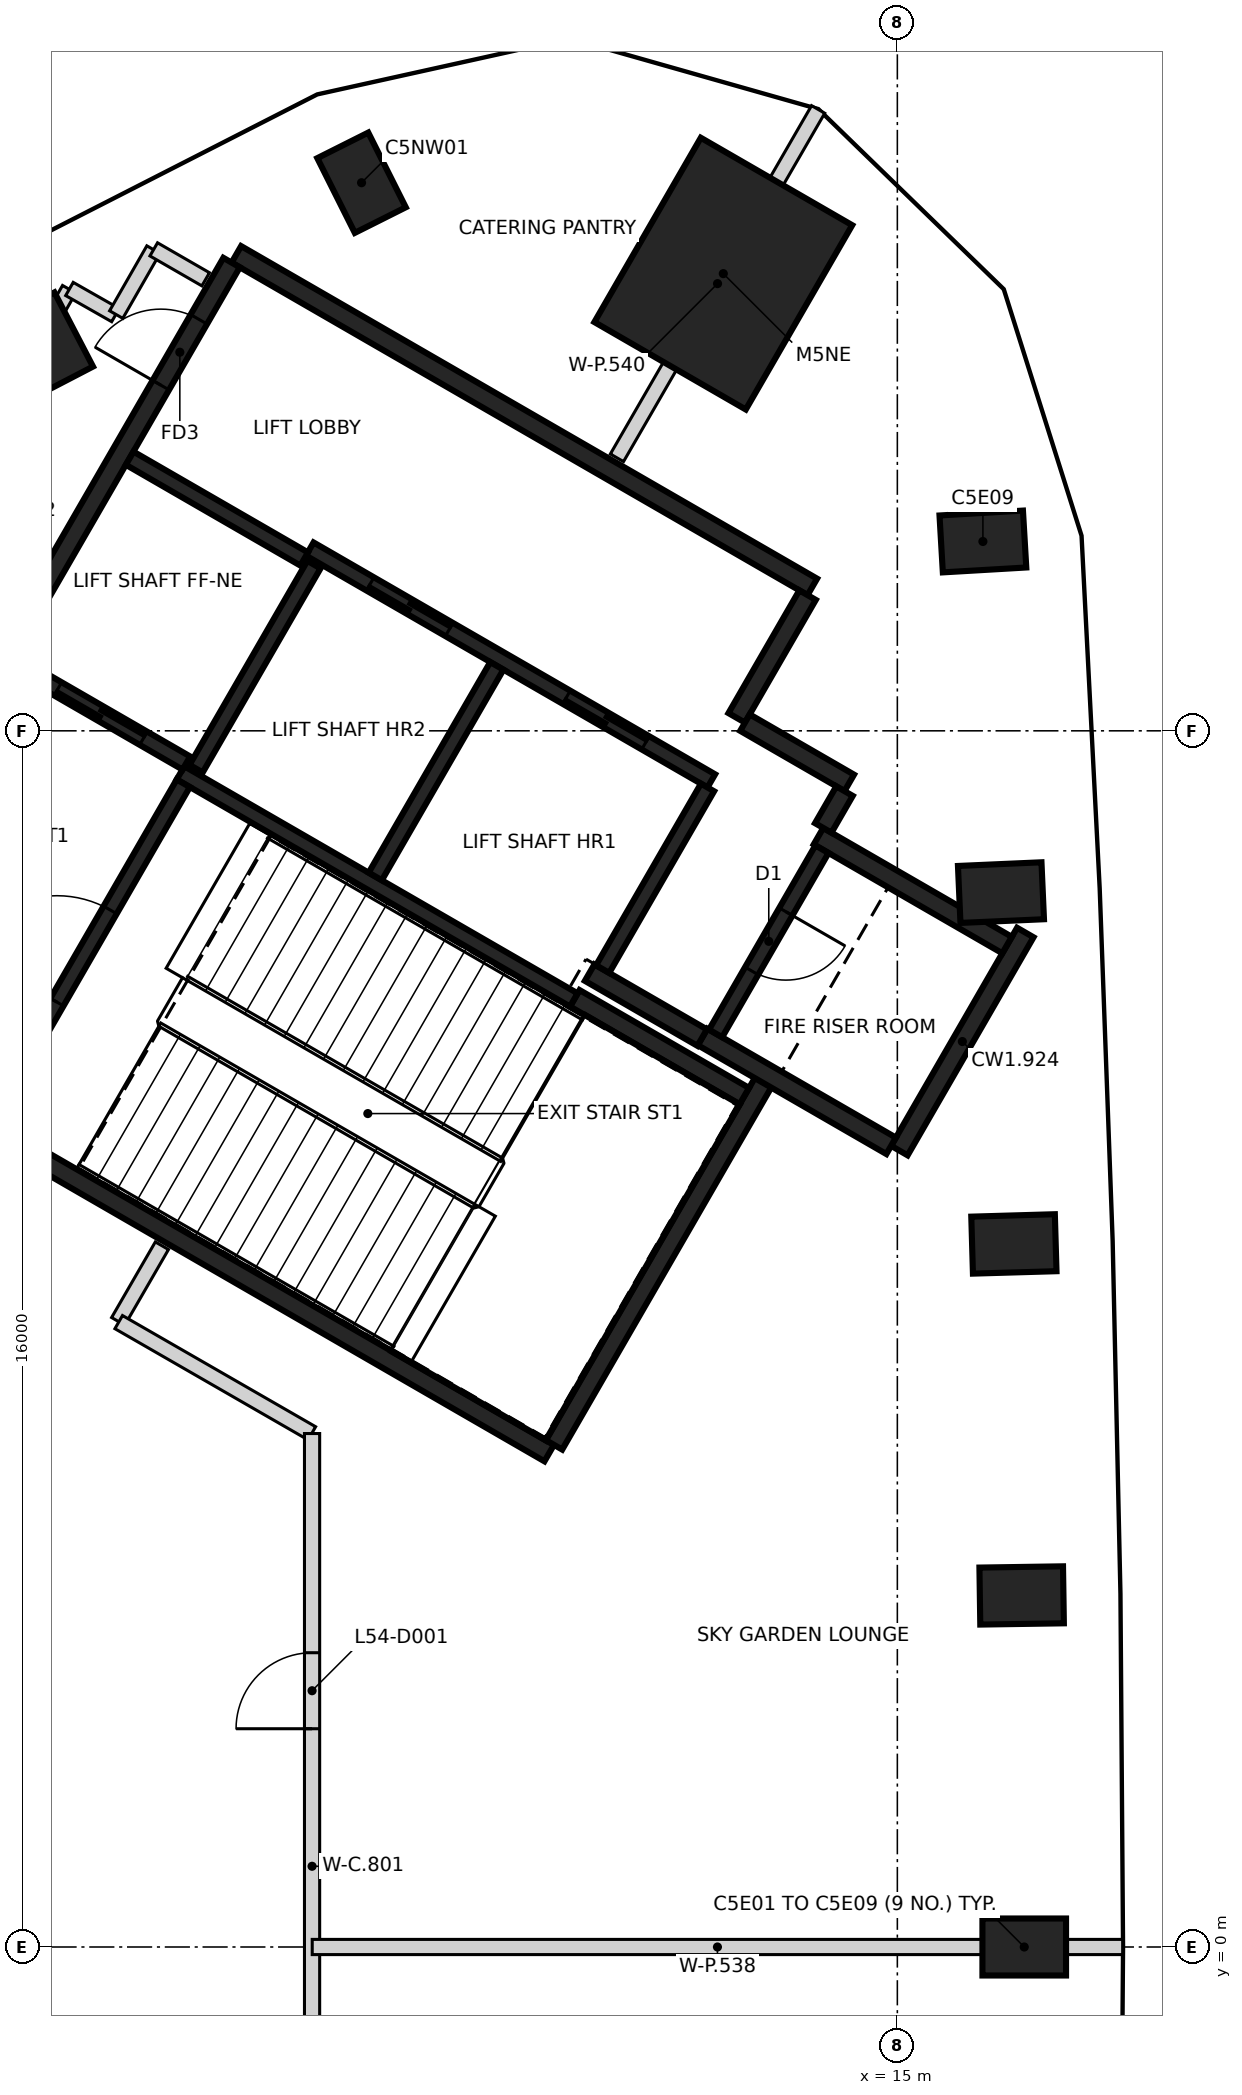
"""IFC4 building model, lengths in metres.
Left out: names, types, materials, properties, quantities, classifications, styles, units other than length and angle.
Written with IfcOpenShell. Run it as: python <this file> out.ifc"""

import sys

from ifc_helpers import new_model, si_unit, direction, frame, frame_2d, origin, origin_2d, place, context, subcontext, project, spatial, rectangle, extrude, element, fill, save


model = new_model("IFC4")
c1 = context("Model", 3, precision=1e-05, world=origin(), true_north=direction((0.0, 1.0)))
c2 = subcontext(c1, "Body", "Model", "MODEL_VIEW")
j1 = project(units=[si_unit("LENGTHUNIT", "METRE"), si_unit("PLANEANGLEUNIT", "RADIAN")], contexts=[c1])
p1 = place(None, origin())
s1 = spatial("IfcSite", under=j1, at=p1, CompositionType="ELEMENT")
p2 = place(p1, origin())
s2 = spatial("IfcBuilding", under=s1, at=p2, CompositionType="ELEMENT")
p3 = place(p2, frame((0.0, 0.0, 216.4)))
s3 = spatial("IfcBuildingStorey", under=s2, at=p3, CompositionType="ELEMENT", Elevation=216.4)
for number, where, z_axis, x_axis in (
    (1, (16.669, 0.0, -0.35), (0.0, 0.0, 1.0), (1.0, 0.0, 0.0)),
    (2, (16.635, 4.625, -0.35), (0.0, 0.0, 1.0), (1.0, 0.015, 0.0)),
    (3, (16.533, 9.25, -0.35), (0.0, 0.0, 1.0), (1.0, 0.029, 0.0)),
    (4, (16.363, 13.872, -0.35), (0.0, 0.0, 1.0), (0.999, 0.044, 0.0)),
    (5, (16.125, 18.491, -0.35), (0.0, 0.0, 1.0), (0.998, 0.058, 0.0)),
    (6, (7.951, 23.211, -0.35), (0.0, 0.0, 1.0), (-0.449, 0.894, 0.0)),
    (7, (3.832, 21.107, -0.35), (0.0, 0.0, 1.0), (-0.461, 0.887, 0.0)),
):
    element("IfcColumn", number, at=place(p3, frame(where, z_axis=z_axis, x_axis=x_axis)), inside=s3, PredefinedType="COLUMN", context=c2, shape_type="SweptSolid", body=[
        extrude(rectangle(XDim=1.1, YDim=0.75, at=origin_2d()), origin(), (0.0, 0.0, 1.0), 5.0),
    ])
p4 = place(p3, frame((12.71, 22.015, -0.35), z_axis=(0.0, 0.0, 1.0), x_axis=(0.5, 0.866025403784, 0.0)))
e8 = element("IfcColumn", 8, at=p4, inside=s3, PredefinedType="COLUMN", context=c2, shape_type="SweptSolid", body=[
    extrude(rectangle(XDim=2.8, YDim=2.3, at=origin_2d()), origin(), (0.0, 0.0, 1.0), 5.0),
])
p5 = place(p3, frame((10.42, 6.498, 0.0), z_axis=(0.0, 0.0, 1.0), x_axis=(-0.866021906294, 0.500006057782, 0.0)))
e9 = element("IfcWall", 9, at=p5, inside=s3, PredefinedType="SHEAR", context=c2, shape_type="SweptSolid", body=[
    extrude(rectangle(XDim=11.55, YDim=0.25, at=frame_2d((5.775, 0.0))), origin(), (0.0, 0.0, 1.0), 4.65),
])
p6 = place(p5, frame((10.025, 0.0, 0.0)))
e10 = element("IfcOpeningElement", 10, at=p6, cuts=e9, PredefinedType="OPENING", context=c2, shape_type="SweptSolid", body=[
    extrude(rectangle(XDim=1.2, YDim=2.1, at=frame_2d((0.6, 1.05))), frame((0.0, 0.135, 0.0), z_axis=(0.0, -1.0, 0.0), x_axis=(1.0, 0.0, 0.0)), (0.0, 0.0, 1.0), 0.27),
])
p7 = place(p5, frame((8.725, 0.0, 0.0)))
e11 = element("IfcOpeningElement", 11, at=p7, cuts=e9, PredefinedType="OPENING", context=c2, shape_type="SweptSolid", body=[
    extrude(rectangle(XDim=1.2, YDim=2.1, at=frame_2d((0.6, 1.05))), frame((0.0, 0.135, 0.0), z_axis=(0.0, -1.0, 0.0), x_axis=(1.0, 0.0, 0.0)), (0.0, 0.0, 1.0), 0.27),
])
p8 = place(p3, frame((6.304, 22.269, 0.0), z_axis=(0.0, 0.0, 1.0), x_axis=(0.866022959057, -0.500004234368, 0.0)))
e12 = element("IfcWall", 12, at=p8, inside=s3, PredefinedType="SHEAR", context=c2, shape_type="SweptSolid", body=[
    extrude(rectangle(XDim=8.75, YDim=0.25, at=frame_2d((4.375, 0.0))), origin(), (0.0, 0.0, 1.0), 4.65),
])
p9 = place(p3, frame((3.179, 16.856, 0.0), z_axis=(0.0, 0.0, 1.0), x_axis=(0.500001955336, 0.866024274868, 0.0)))
e13 = element("IfcWall", 13, at=p9, inside=s3, PredefinedType="SHEAR", context=c2, shape_type="SweptSolid", body=[
    extrude(rectangle(XDim=6.125, YDim=0.25, at=frame_2d((3.062, 0.0))), origin(), (0.0, 0.0, 1.0), 4.65),
])
p10 = place(p9, frame((4.263, 0.0, 0.0)))
e14 = element("IfcOpeningElement", 14, at=p10, cuts=e13, PredefinedType="OPENING", context=c2, shape_type="SweptSolid", body=[
    extrude(rectangle(XDim=1.0, YDim=2.1, at=frame_2d((0.5, 1.05))), frame((0.0, 0.135, 0.0), z_axis=(0.0, -1.0, 0.0), x_axis=(1.0, 0.0, 0.0)), (0.0, 0.0, 1.0), 0.27),
])
p11 = place(p3, frame((13.238, 11.378, 0.0), z_axis=(0.0, 0.0, 1.0), x_axis=(-0.500008851346, -0.866020293397, 0.0)))
e15 = element("IfcWall", 15, at=p11, inside=s3, PredefinedType="SHEAR", context=c2, shape_type="SweptSolid", body=[
    extrude(rectangle(XDim=5.51, YDim=0.25, at=frame_2d((2.755, 0.0))), origin(), (0.0, 0.0, 1.0), 4.65),
])
p12 = place(p3, frame((16.684, 13.347, 0.0), z_axis=(0.0, 0.0, 1.0), x_axis=(-0.499998874531, -0.866026053573, 0.0)))
e16 = element("IfcWall", 16, at=p12, inside=s3, PredefinedType="SHEAR", context=c2, shape_type="SweptSolid", body=[
    extrude(rectangle(XDim=3.313, YDim=0.25, at=frame_2d((1.656, 0.0))), origin(), (0.0, 0.0, 1.0), 4.65),
])
p13 = place(p3, frame((14.918, 10.54, 0.0), z_axis=(0.0, 0.0, 1.0), x_axis=(-0.866063538972, 0.499933942099, 0.0)))
e17 = element("IfcWall", 17, at=p13, inside=s3, PredefinedType="SHEAR", context=c2, shape_type="SweptSolid", body=[
    extrude(rectangle(XDim=2.865, YDim=0.25, at=frame_2d((1.432, 0.0))), origin(), (0.0, 0.0, 1.0), 4.65),
])
p14 = place(p3, frame((13.963, 14.614, 0.0), z_axis=(0.0, 0.0, 1.0), x_axis=(0.866042235819, -0.499970844928, 0.0)))
e18 = element("IfcWall", 18, at=p14, inside=s3, PredefinedType="SHEAR", context=c2, shape_type="SweptSolid", body=[
    extrude(rectangle(XDim=2.865, YDim=0.25, at=frame_2d((1.432, 0.0))), origin(), (0.0, 0.0, 1.0), 4.65),
])
p15 = place(p3, frame((10.757, 12.481, 0.0), z_axis=(0.0, 0.0, 1.0), x_axis=(0.866022940537, -0.500004266446, 0.0)))
e19 = element("IfcWall", 19, at=p15, inside=s3, PredefinedType="SHEAR", context=c2, shape_type="SweptSolid", body=[
    extrude(rectangle(XDim=2.575, YDim=0.25, at=frame_2d((1.287, 0.0))), origin(), (0.0, 0.0, 1.0), 4.65),
])
p16 = place(p3, frame((13.819, 17.785, 0.0), z_axis=(0.0, 0.0, 1.0), x_axis=(-0.500039802285, -0.866002422705, 0.0)))
e20 = element("IfcWall", 20, at=p16, inside=s3, PredefinedType="SHEAR", context=c2, shape_type="SweptSolid", body=[
    extrude(rectangle(XDim=1.865, YDim=0.25, at=frame_2d((0.932, 0.0))), origin(), (0.0, 0.0, 1.0), 4.65),
])
p17 = place(p3, frame((12.433, 11.964, 0.0), z_axis=(0.0, 0.0, 1.0), x_axis=(-0.866038183914, 0.499977863513, 0.0)))
e21 = element("IfcWall", 21, at=p17, inside=s3, PredefinedType="SHEAR", context=c2, shape_type="SweptSolid", body=[
    extrude(rectangle(XDim=1.71, YDim=0.25, at=frame_2d((0.855, 0.0))), origin(), (0.0, 0.0, 1.0), 4.65),
])
p18 = place(p3, frame((12.995, 16.108, 0.0), z_axis=(0.0, 0.0, 1.0), x_axis=(0.866044474677, -0.49996696679, 0.0)))
e22 = element("IfcWall", 22, at=p18, inside=s3, PredefinedType="SHEAR", context=c2, shape_type="SweptSolid", body=[
    extrude(rectangle(XDim=1.584, YDim=0.25, at=frame_2d((0.792, 0.0))), origin(), (0.0, 0.0, 1.0), 4.65),
])
p19 = place(p3, frame((14.305, 15.207, 0.0), z_axis=(0.0, 0.0, 1.0), x_axis=(-0.499848422343, -0.866112899501, 0.0)))
e23 = element("IfcWall", 23, at=p19, inside=s3, PredefinedType="SHEAR", context=c2, shape_type="SweptSolid", body=[
    extrude(rectangle(XDim=0.559, YDim=0.25, at=frame_2d((0.28, 0.0))), origin(), (0.0, 0.0, 1.0), 4.65),
])
p20 = place(p3, frame((12.552, 15.342, 0.0), z_axis=(0.0, 0.0, 1.0), x_axis=(-0.866030299012, 0.499991521122, 0.0)))
e24 = element("IfcWall", 24, at=p20, inside=s3, PredefinedType="SHEAR", context=c2, shape_type="SweptSolid", body=[
    extrude(rectangle(XDim=6.1, YDim=0.2, at=frame_2d((3.05, 0.0))), origin(), (0.0, 0.0, 1.0), 4.65),
])
p21 = place(p20, frame((1.0, 0.0, 0.0)))
e25 = element("IfcOpeningElement", 25, at=p21, cuts=e24, PredefinedType="OPENING", context=c2, shape_type="SweptSolid", body=[
    extrude(rectangle(XDim=1.2, YDim=2.1, at=frame_2d((0.6, 1.05))), frame((0.0, 0.11, 0.0), z_axis=(0.0, -1.0, 0.0), x_axis=(1.0, 0.0, 0.0)), (0.0, 0.0, 1.0), 0.22),
])
p22 = place(p20, frame((3.982, 0.0, 0.0)))
e26 = element("IfcOpeningElement", 26, at=p22, cuts=e24, PredefinedType="OPENING", context=c2, shape_type="SweptSolid", body=[
    extrude(rectangle(XDim=1.2, YDim=2.1, at=frame_2d((0.6, 1.05))), frame((0.0, 0.11, 0.0), z_axis=(0.0, -1.0, 0.0), x_axis=(1.0, 0.0, 0.0)), (0.0, 0.0, 1.0), 0.22),
])
p23 = place(p3, frame((10.743, 12.46, 0.0), z_axis=(0.0, 0.0, 1.0), x_axis=(-0.866018848283, 0.500011354289, 0.0)))
e27 = element("IfcWall", 27, at=p23, inside=s3, PredefinedType="SHEAR", context=c2, shape_type="SweptSolid", body=[
    extrude(rectangle(XDim=5.974, YDim=0.2, at=frame_2d((2.987, 0.0))), origin(), (0.0, 0.0, 1.0), 4.65),
])
p24 = place(p3, frame((3.057, 10.895, 0.0), z_axis=(0.0, 0.0, 1.0), x_axis=(0.500027839223, 0.866009330205, 0.0)))
e28 = element("IfcWall", 28, at=p24, inside=s3, PredefinedType="SHEAR", context=c2, shape_type="SweptSolid", body=[
    extrude(rectangle(XDim=5.098, YDim=0.2, at=frame_2d((2.549, 0.0))), origin(), (0.0, 0.0, 1.0), 4.65),
])
p25 = place(p24, frame((1.774, 0.0, 0.0)))
e29 = element("IfcOpeningElement", 29, at=p25, cuts=e28, PredefinedType="OPENING", context=c2, shape_type="SweptSolid", body=[
    extrude(rectangle(XDim=1.4, YDim=2.1, at=frame_2d((0.7, 1.05))), frame((0.0, 0.11, 0.0), z_axis=(0.0, -1.0, 0.0), x_axis=(1.0, 0.0, 0.0)), (0.0, 0.0, 1.0), 0.22),
])
p26 = place(p3, frame((8.132, 14.084, 0.0), z_axis=(0.0, 0.0, 1.0), x_axis=(0.500030834389, 0.86600760081, 0.0)))
e30 = element("IfcWall", 30, at=p26, inside=s3, PredefinedType="SHEAR", context=c2, shape_type="SweptSolid", body=[
    extrude(rectangle(XDim=3.198, YDim=0.2, at=frame_2d((1.599, 0.0))), origin(), (0.0, 0.0, 1.0), 4.65),
])
p27 = place(p3, frame((14.008, 14.442, 0.0), z_axis=(0.0, 0.0, 1.0), x_axis=(-0.499986818241, -0.866033014143, 0.0)))
e31 = element("IfcWall", 31, at=p27, inside=s3, PredefinedType="SHEAR", context=c2, shape_type="SweptSolid", body=[
    extrude(rectangle(XDim=2.798, YDim=0.2, at=frame_2d((1.399, 0.0))), origin(), (0.0, 0.0, 1.0), 4.65),
])
p28 = place(p27, frame((0.949, 0.0, 0.0)))
e32 = element("IfcOpeningElement", 32, at=p28, cuts=e31, PredefinedType="OPENING", context=c2, shape_type="SweptSolid", body=[
    extrude(rectangle(XDim=0.9, YDim=2.1, at=frame_2d((0.45, 1.05))), frame((0.0, 0.11, 0.0), z_axis=(0.0, -1.0, 0.0), x_axis=(1.0, 0.0, 0.0)), (0.0, 0.0, 1.0), 0.22),
])
p29 = place(p3, frame((12.502, 15.255, 0.0), z_axis=(0.0, 0.0, 1.0), x_axis=(-0.499965018551, -0.866045599391, 0.0)))
e33 = element("IfcWall", 33, at=p29, inside=s3, PredefinedType="SHEAR", context=c2, shape_type="SweptSolid", body=[
    extrude(rectangle(XDim=2.759, YDim=0.2, at=frame_2d((1.379, 0.0))), origin(), (0.0, 0.0, 1.0), 4.65),
])
p30 = place(p3, frame((7.324, 18.187, 0.0), z_axis=(0.0, 0.0, 1.0), x_axis=(-0.499967891604, -0.866043940782, 0.0)))
e34 = element("IfcWall", 34, at=p30, inside=s3, PredefinedType="SHEAR", context=c2, shape_type="SweptSolid", body=[
    extrude(rectangle(XDim=3.1, YDim=0.2, at=frame_2d((1.55, 0.0))), origin(), (0.0, 0.0, 1.0), 4.65),
])
p31 = place(p3, frame((5.646, 15.576, 0.0), z_axis=(0.0, 0.0, 1.0), x_axis=(-0.866018407898, 0.500012117035, 0.0)))
e35 = element("IfcWall", 35, at=p31, inside=s3, PredefinedType="SHEAR", context=c2, shape_type="SweptSolid", body=[
    extrude(rectangle(XDim=2.651, YDim=0.2, at=frame_2d((1.325, 0.0))), origin(), (0.0, 0.0, 1.0), 4.65),
])
p32 = place(p31, frame((0.652, 0.0, 0.0)))
e36 = element("IfcOpeningElement", 36, at=p32, cuts=e35, PredefinedType="OPENING", context=c2, shape_type="SweptSolid", body=[
    extrude(rectangle(XDim=1.3, YDim=2.1, at=frame_2d((0.65, 1.05))), frame((0.0, 0.11, 0.0), z_axis=(0.0, -1.0, 0.0), x_axis=(1.0, 0.0, 0.0)), (0.0, 0.0, 1.0), 0.22),
])
p33 = place(p3, frame((7.196, 18.26, 0.0), z_axis=(0.0, 0.0, 1.0), x_axis=(-0.866018407898, 0.500012117035, 0.0)))
e37 = element("IfcWall", 37, at=p33, inside=s3, PredefinedType="SHEAR", context=c2, shape_type="SweptSolid", body=[
    extrude(rectangle(XDim=2.651, YDim=0.2, at=frame_2d((1.325, 0.0))), origin(), (0.0, 0.0, 1.0), 4.65),
])
p34 = place(p3, frame((-1.036, 12.743, 0.0), z_axis=(0.0, 0.0, 1.0), x_axis=(0.49314672747, 0.869946150739, 0.0)))
e38 = element("IfcWall", 38, at=p34, inside=s3, PredefinedType="PARTITIONING", context=c2, shape_type="SweptSolid", body=[
    extrude(rectangle(XDim=10.423, YDim=0.2, at=frame_2d((5.211, 0.0))), origin(), (0.0, 0.0, 1.0), 3.75),
])
p35 = place(p34, frame((5.612, 0.0, 0.0)))
e39 = element("IfcOpeningElement", 39, at=p35, cuts=e38, PredefinedType="OPENING", context=c2, shape_type="SweptSolid", body=[
    extrude(rectangle(XDim=0.9, YDim=2.1, at=frame_2d((0.45, 1.05))), frame((0.0, 0.11, 0.0), z_axis=(0.0, -1.0, 0.0), x_axis=(1.0, 0.0, 0.0)), (0.0, 0.0, 1.0), 0.22),
])
p36 = place(p3, frame((4.108, 21.813, 0.0), z_axis=(0.0, 0.0, 1.0), x_axis=(0.869298985779, -0.494286630735, 0.0)))
e40 = element("IfcWall", 40, at=p36, inside=s3, PredefinedType="PARTITIONING", context=c2, shape_type="SweptSolid", body=[
    extrude(rectangle(XDim=0.696, YDim=0.2, at=frame_2d((0.348, 0.0))), origin(), (0.0, 0.0, 1.0), 3.75),
])
p37 = place(p3, frame((4.723, 21.476, 0.0), z_axis=(0.0, 0.0, 1.0), x_axis=(0.497232452162, 0.867617362964, 0.0)))
e41 = element("IfcWall", 41, at=p37, inside=s3, PredefinedType="PARTITIONING", context=c2, shape_type="SweptSolid", body=[
    extrude(rectangle(XDim=0.985, YDim=0.2, at=frame_2d((0.493, 0.0))), origin(), (0.0, 0.0, 1.0), 3.75),
])
p38 = place(p3, frame((4.749, 8.231, 0.0), z_axis=(0.0, 0.0, 1.0), x_axis=(0.500592486553, 0.865683061176, 0.0)))
e42 = element("IfcWall", 42, at=p38, inside=s3, PredefinedType="PARTITIONING", context=c2, shape_type="SweptSolid", body=[
    extrude(rectangle(XDim=1.149, YDim=0.2, at=frame_2d((0.575, 0.0))), origin(), (0.0, 0.0, 1.0), 4.65),
])
p39 = place(p3, frame((4.756, 8.221, 0.0), z_axis=(0.0, 0.0, 1.0), x_axis=(0.86663991364, -0.498934123994, 0.0)))
e43 = element("IfcWall", 43, at=p39, inside=s3, PredefinedType="PARTITIONING", context=c2, shape_type="SweptSolid", body=[
    extrude(rectangle(XDim=2.932, YDim=0.2, at=frame_2d((1.466, 0.0))), origin(), (0.0, 0.0, 1.0), 4.65),
])
p40 = place(p3, frame((5.217, 22.334, 0.0), z_axis=(0.0, 0.0, 1.0), x_axis=(0.866293770924, -0.499534886128, 0.0)))
e44 = element("IfcWall", 44, at=p40, inside=s3, PredefinedType="PARTITIONING", context=c2, shape_type="SweptSolid", body=[
    extrude(rectangle(XDim=0.789, YDim=0.2, at=frame_2d((0.395, 0.0))), origin(), (0.0, 0.0, 1.0), 3.75),
])
p41 = place(p3, frame((7.3, -4.631, 0.0), z_axis=(0.0, 0.0, 1.0), x_axis=(0.0, 1.0, 0.0)))
e45 = element("IfcWall", 45, at=p41, inside=s3, PredefinedType="PARTITIONING", context=c2, shape_type="SweptSolid", body=[
    extrude(rectangle(XDim=11.386, YDim=0.2, at=frame_2d((5.693, 0.0))), origin(), (0.0, 0.0, 1.0), 4.65),
])
p42 = place(p41, frame((7.502, 0.0, 0.0)))
e46 = element("IfcOpeningElement", 46, at=p42, cuts=e45, PredefinedType="OPENING", context=c2, shape_type="SweptSolid", body=[
    extrude(rectangle(XDim=1.0, YDim=2.1, at=frame_2d((0.5, 1.05))), frame((0.0, 0.11, 0.0), z_axis=(0.0, -1.0, 0.0), x_axis=(1.0, 0.0, 0.0)), (0.0, 0.0, 1.0), 0.22),
])
p43 = place(p3, frame((7.302, 0.0, 0.0), z_axis=(0.0, 0.0, 1.0), x_axis=(1.0, 0.0, 0.0)))
e47 = element("IfcWall", 47, at=p43, inside=s3, PredefinedType="PARTITIONING", context=c2, shape_type="SweptSolid", body=[
    extrude(rectangle(XDim=10.662, YDim=0.2, at=frame_2d((5.331, 0.0))), origin(), (0.0, 0.0, 1.0), 4.65),
])
p44 = place(p3, frame((11.311, 19.592, 0.0), z_axis=(0.0, 0.0, 1.0), x_axis=(0.500132351176, 0.865948977311, 0.0)))
e48 = element("IfcWall", 48, at=p44, inside=s3, PredefinedType="PARTITIONING", context=c2, shape_type="SweptSolid", body=[
    extrude(rectangle(XDim=5.293, YDim=0.2, at=frame_2d((2.646, 0.0))), origin(), (0.0, 0.0, 1.0), 4.65),
])
p45 = place(p32, origin())
e49 = element("IfcDoor", 49, at=p45, inside=s3, OperationType="SLIDING_TO_RIGHT", PredefinedType="DOOR", context=c2, shape_type="SweptSolid", body=[
    extrude(rectangle(XDim=1.3, YDim=2.1, at=frame_2d((0.65, 1.05))), frame((0.0, 0.025, 0.0), z_axis=(0.0, -1.0, 0.0), x_axis=(1.0, 0.0, 0.0)), (0.0, 0.0, 1.0), 0.05),
])
fill(e36, e49)
p46 = place(p21, origin())
e50 = element("IfcDoor", 50, at=p46, inside=s3, OperationType="DOUBLE_DOOR_SLIDING", PredefinedType="DOOR", context=c2, shape_type="SweptSolid", body=[
    extrude(rectangle(XDim=1.2, YDim=2.1, at=frame_2d((0.6, 1.05))), frame((0.0, 0.025, 0.0), z_axis=(0.0, -1.0, 0.0), x_axis=(1.0, 0.0, 0.0)), (0.0, 0.0, 1.0), 0.05),
])
fill(e25, e50)
p47 = place(p22, origin())
e51 = element("IfcDoor", 51, at=p47, inside=s3, OperationType="DOUBLE_DOOR_SLIDING", PredefinedType="DOOR", context=c2, shape_type="SweptSolid", body=[
    extrude(rectangle(XDim=1.2, YDim=2.1, at=frame_2d((0.6, 1.05))), frame((0.0, 0.025, 0.0), z_axis=(0.0, -1.0, 0.0), x_axis=(1.0, 0.0, 0.0)), (0.0, 0.0, 1.0), 0.05),
])
fill(e26, e51)
p48 = place(p10, origin())
e52 = element("IfcDoor", 52, at=p48, inside=s3, OperationType="SINGLE_SWING_LEFT", PredefinedType="DOOR", context=c2, shape_type="SweptSolid", body=[
    extrude(rectangle(XDim=1.0, YDim=2.1, at=frame_2d((0.5, 1.05))), frame((0.0, 0.025, 0.0), z_axis=(0.0, -1.0, 0.0), x_axis=(1.0, 0.0, 0.0)), (0.0, 0.0, 1.0), 0.05),
])
fill(e14, e52)
p49 = place(p25, origin())
e53 = element("IfcDoor", 53, at=p49, inside=s3, OperationType="SINGLE_SWING_RIGHT", PredefinedType="DOOR", context=c2, shape_type="SweptSolid", body=[
    extrude(rectangle(XDim=1.4, YDim=2.1, at=frame_2d((0.7, 1.05))), frame((0.0, 0.025, 0.0), z_axis=(0.0, -1.0, 0.0), x_axis=(1.0, 0.0, 0.0)), (0.0, 0.0, 1.0), 0.05),
])
fill(e29, e53)
p50 = place(p28, origin())
e54 = element("IfcDoor", 54, at=p50, inside=s3, OperationType="SINGLE_SWING_LEFT", PredefinedType="DOOR", context=c2, shape_type="SweptSolid", body=[
    extrude(rectangle(XDim=0.9, YDim=2.1, at=frame_2d((0.45, 1.05))), frame((0.0, 0.025, 0.0), z_axis=(0.0, -1.0, 0.0), x_axis=(1.0, 0.0, 0.0)), (0.0, 0.0, 1.0), 0.05),
])
fill(e32, e54)
p51 = place(p42, frame((1.0, 0.0, 0.0), z_axis=(0.0, 0.0, 1.0), x_axis=(-1.0, 0.0, 0.0)))
e55 = element("IfcDoor", 55, at=p51, inside=s3, OperationType="SINGLE_SWING_LEFT", PredefinedType="DOOR", context=c2, shape_type="SweptSolid", body=[
    extrude(rectangle(XDim=1.0, YDim=2.1, at=frame_2d((0.5, 1.05))), frame((0.0, 0.025, 0.0), z_axis=(0.0, -1.0, 0.0), x_axis=(1.0, 0.0, 0.0)), (0.0, 0.0, 1.0), 0.05),
])
fill(e46, e55)
save(model, sys.argv[1])
